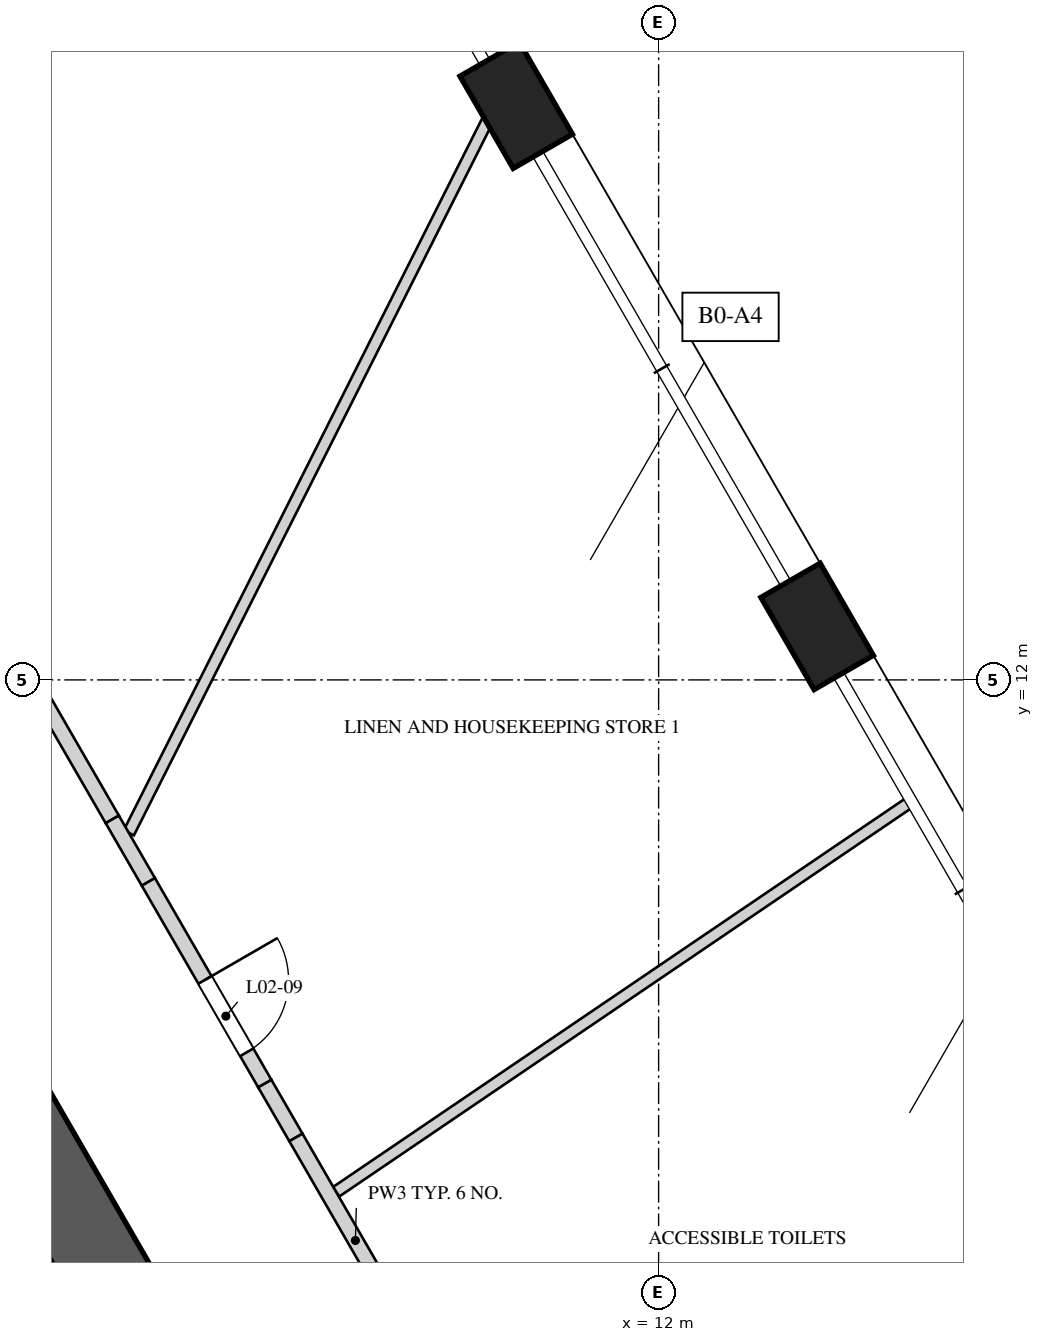
"""IFC4 building model, lengths in metres.
Left out: names, types, materials, properties, quantities, classifications, styles, units other than length and angle.
Written with IfcOpenShell. Run it as: python <this file> out.ifc"""

import sys

from ifc_helpers import new_model, si_unit, direction, frame, frame_2d, origin, origin_2d, place, context, subcontext, project, spatial, rectangle, extrude, element, fill, save


model = new_model("IFC4")
c1 = context("Model", 3, precision=1e-05, world=origin(), true_north=direction((0.0, 1.0)))
c2 = subcontext(c1, "Body", "Model", "MODEL_VIEW")
j1 = project(units=[si_unit("LENGTHUNIT", "METRE"), si_unit("PLANEANGLEUNIT", "RADIAN")], contexts=[c1])
p1 = place(None, origin())
s1 = spatial("IfcSite", under=j1, at=p1, CompositionType="ELEMENT")
p2 = place(p1, origin())
s2 = spatial("IfcBuilding", under=s1, at=p2, CompositionType="ELEMENT")
p3 = place(p2, frame((0.0, 0.0, 15.0)))
s3 = spatial("IfcBuildingStorey", under=s2, at=p3, CompositionType="ELEMENT", Elevation=15.0)
p4 = place(p3, frame((9.613, -4.25, 0.0), z_axis=(0.0, 0.0, 1.0), x_axis=(-0.500001757713, 0.866024388966, 0.0)))
e1 = element("IfcWall", 1, at=p4, inside=s3, PredefinedType="SHEAR", context=c2, shape_type="SweptSolid", body=[
    extrude(rectangle(XDim=16.974, YDim=1.1, at=frame_2d((8.487, 0.0))), origin(), (0.0, 0.0, 1.0), 5.0),
])
p5 = place(p4, frame((6.762, 0.0, 0.0)))
e2 = element("IfcOpeningElement", 2, at=p5, cuts=e1, PredefinedType="OPENING", context=c2, shape_type="SweptSolid", body=[
    extrude(rectangle(XDim=1.0, YDim=2.4, at=frame_2d((0.5, 1.2))), frame((0.0, 0.56, 0.0), z_axis=(0.0, -1.0, 0.0), x_axis=(1.0, 0.0, 0.0)), (0.0, 0.0, 1.0), 1.12),
])
for number, where, z_axis, x_axis in (
    (3, (14.085, 12.704, 0.0), (0.0, 0.0, 1.0), (-0.5, 0.866, 0.0)),
    (4, (10.126, 19.561, 0.0), (0.0, 0.0, 1.0), (-0.5, 0.866, 0.0)),
):
    element("IfcColumn", number, at=place(p3, frame(where, z_axis=z_axis, x_axis=x_axis)), inside=s3, PredefinedType="COLUMN", context=c2, shape_type="SweptSolid", body=[
        extrude(rectangle(XDim=1.4, YDim=0.9, at=origin_2d()), origin(), (0.0, 0.0, 1.0), 5.0),
    ])
p6 = place(p3, frame((5.005, 2.231, 0.0), z_axis=(0.0, 0.0, 1.0), x_axis=(-0.500002801628, 0.866023786258, 0.0)))
e5 = element("IfcWall", 5, at=p6, inside=s3, PredefinedType="SOLIDWALL", context=c2, shape_type="SweptSolid", body=[
    extrude(rectangle(XDim=4.9, YDim=0.2, at=frame_2d((2.45, 0.0))), origin(), (0.0, 0.0, 1.0), 4.65),
])
p7 = place(p3, frame((7.757, 5.265, 0.0), z_axis=(0.0, 0.0, 1.0), x_axis=(0.827367178153, 0.561661421601, 0.0)))
e6 = element("IfcWall", 6, at=p7, inside=s3, PredefinedType="PARTITIONING", context=c2, shape_type="SweptSolid", body=[
    extrude(rectangle(XDim=9.104, YDim=0.15, at=frame_2d((4.552, 0.0))), origin(), (0.0, 0.0, 1.0), 4.65),
])
p8 = place(p3, frame((9.914, 19.688, 0.0), z_axis=(0.0, 0.0, 1.0), x_axis=(-0.449738583761, -0.893160235499, 0.0)))
e7 = element("IfcWall", 7, at=p8, inside=s3, PredefinedType="PARTITIONING", context=c2, shape_type="SweptSolid", body=[
    extrude(rectangle(XDim=10.86, YDim=0.15, at=frame_2d((5.43, 0.0))), origin(), (0.0, 0.0, 1.0), 3.75),
])
p9 = place(p3, frame((3.404, 12.604, 0.0), z_axis=(0.0, 0.0, 1.0), x_axis=(0.500000186108, -0.866025296335, 0.0)))
e8 = element("IfcWall", 8, at=p9, inside=s3, PredefinedType="SOLIDWALL", context=c2, shape_type="SweptSolid", body=[
    extrude(rectangle(XDim=2.815, YDim=0.2, at=frame_2d((1.408, 0.0))), origin(), (0.0, 0.0, 1.0), 4.65),
])
p10 = place(p3, frame((4.812, 10.165, 0.0), z_axis=(0.0, 0.0, 1.0), x_axis=(0.500174821557, -0.865924446982, 0.0)))
e9 = element("IfcWall", 9, at=p10, inside=s3, PredefinedType="SOLIDWALL", context=c2, shape_type="SweptSolid", body=[
    extrude(rectangle(XDim=0.95, YDim=0.2, at=frame_2d((0.475, 0.0))), origin(), (0.0, 0.0, 1.0), 3.75),
])
p11 = place(p3, frame((5.287, 9.343, 0.0), z_axis=(0.0, 0.0, 1.0), x_axis=(0.499952348839, -0.866052913447, 0.0)))
e10 = element("IfcWall", 10, at=p11, inside=s3, PredefinedType="SOLIDWALL", context=c2, shape_type="SweptSolid", body=[
    extrude(rectangle(XDim=3.064, YDim=0.2, at=frame_2d((1.532, 0.0))), origin(), (0.0, 0.0, 1.0), 4.65),
])
p12 = place(p11, frame((1.489, 0.0, 0.0)))
e11 = element("IfcOpeningElement", 11, at=p12, cuts=e10, PredefinedType="OPENING", context=c2, shape_type="SweptSolid", body=[
    extrude(rectangle(XDim=1.1, YDim=2.4, at=frame_2d((0.55, 1.2))), frame((0.0, 0.11, 0.0), z_axis=(0.0, -1.0, 0.0), x_axis=(1.0, 0.0, 0.0)), (0.0, 0.0, 1.0), 0.22),
])
p13 = place(p3, frame((6.819, 6.689, 0.0), z_axis=(0.0, 0.0, 1.0), x_axis=(0.500118501653, -0.865956976012, 0.0)))
e12 = element("IfcWall", 12, at=p13, inside=s3, PredefinedType="SOLIDWALL", context=c2, shape_type="SweptSolid", body=[
    extrude(rectangle(XDim=0.818, YDim=0.2, at=frame_2d((0.409, 0.0))), origin(), (0.0, 0.0, 1.0), 3.75),
])
p14 = place(p3, frame((7.228, 5.98, 0.0), z_axis=(0.0, 0.0, 1.0), x_axis=(0.499947505232, -0.866055709532, 0.0)))
e13 = element("IfcWall", 13, at=p14, inside=s3, PredefinedType="SOLIDWALL", context=c2, shape_type="SweptSolid", body=[
    extrude(rectangle(XDim=3.13, YDim=0.2, at=frame_2d((1.565, 0.0))), origin(), (0.0, 0.0, 1.0), 4.65),
])
p15 = place(p12, origin())
e14 = element("IfcDoor", 14, at=p15, inside=s3, OperationType="SINGLE_SWING_LEFT", PredefinedType="DOOR", context=c2, shape_type="SweptSolid", body=[
    extrude(rectangle(XDim=1.1, YDim=2.4, at=frame_2d((0.55, 1.2))), frame((0.0, 0.025, 0.0), z_axis=(0.0, -1.0, 0.0), x_axis=(1.0, 0.0, 0.0)), (0.0, 0.0, 1.0), 0.05),
])
fill(e11, e14)
save(model, sys.argv[1])
